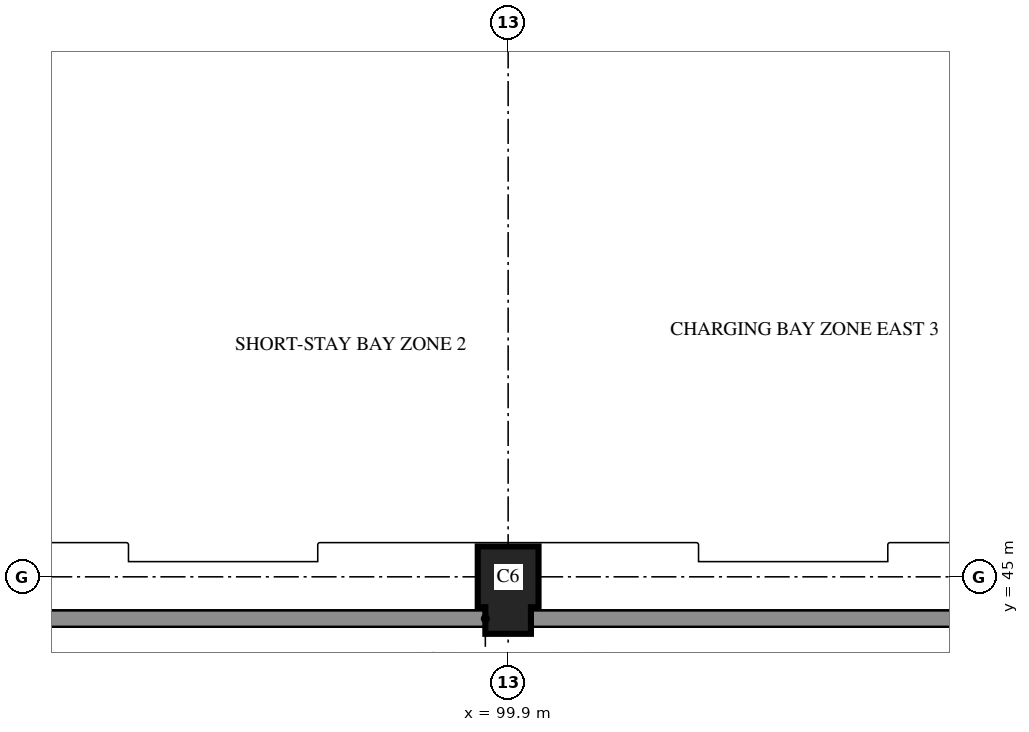
"""IFC4 building model, lengths in metres.
Left out: names, types, materials, properties, quantities, classifications, styles, units other than length and angle.
Written with IfcOpenShell. Run it as: python <this file> out.ifc"""

import sys

from ifc_helpers import new_model, si_unit, direction, frame, origin, place, context, subcontext, project, spatial, polyline, outline, extrude, element, save


model = new_model("IFC4")
c1 = context("Model", 3, precision=1e-05, world=origin(), true_north=direction((0.0, 1.0)))
c2 = subcontext(c1, "Body", "Model", "MODEL_VIEW")
j1 = project(units=[si_unit("LENGTHUNIT", "METRE"), si_unit("PLANEANGLEUNIT", "RADIAN")], contexts=[c1])
p1 = place(None, origin())
s1 = spatial("IfcSite", under=j1, at=p1, CompositionType="ELEMENT")
p2 = place(p1, origin())
s2 = spatial("IfcBuilding", under=s1, at=p2, CompositionType="ELEMENT")
p3 = place(p2, frame((0.0, 0.0, 11.9)))
s3 = spatial("IfcBuildingStorey", under=s2, at=p3, CompositionType="ELEMENT", Elevation=11.9)
p4 = place(p3, frame((99.9, 45.0, 0.0), z_axis=(0.0, 0.0, 1.0), x_axis=(0.0, -1.0, 0.0)))
e1 = element("IfcColumn", 1, at=p4, inside=s3, PredefinedType="COLUMN", context=c2, shape_type="SweptSolid", body=[
    extrude(outline(polyline([(-0.4, -0.4), (0.4, -0.4), (0.4, -0.3), (0.75, -0.3), (0.75, 0.3), (0.4, 0.3), (0.4, 0.4), (-0.4, 0.4), (-0.4, -0.4)])), origin(), (0.0, 0.0, 1.0), 3.7),
])
save(model, sys.argv[1])
